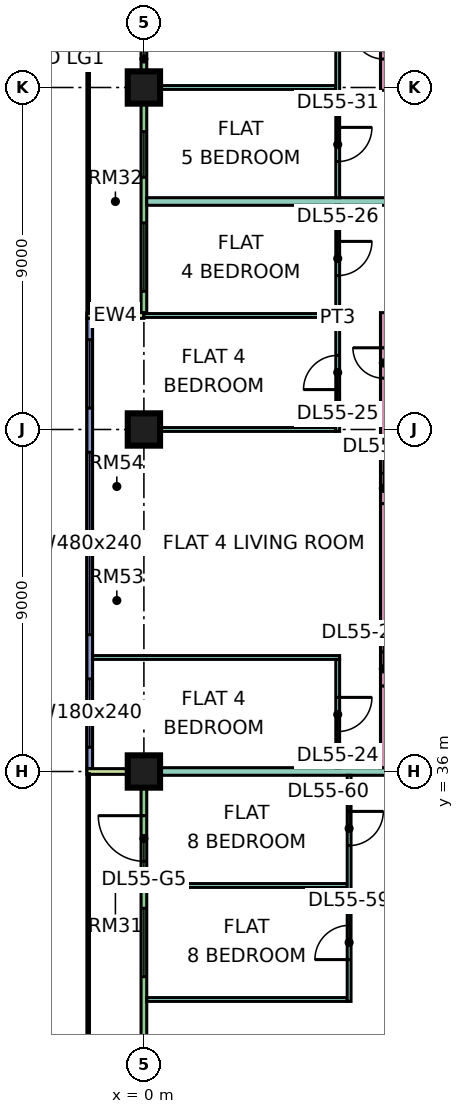
"""IFC4 building model, lengths in metres.
Left out: names, types, materials, properties, quantities, classifications, styles, units other than length and angle.
Written with IfcOpenShell. Run it as: python <this file> out.ifc"""

import sys

from ifc_helpers import new_model, si_unit, direction, frame, frame_2d, origin, origin_2d, place, context, subcontext, project, spatial, rectangle, extrude, element, fill, save


model = new_model("IFC4")
c1 = context("Model", 3, precision=1e-05, world=origin(), true_north=direction((0.0, 1.0)))
c2 = subcontext(c1, "Body", "Model", "MODEL_VIEW")
j1 = project(units=[si_unit("LENGTHUNIT", "METRE"), si_unit("PLANEANGLEUNIT", "RADIAN")], contexts=[c1])
p1 = place(None, origin())
s1 = spatial("IfcSite", under=j1, at=p1, CompositionType="ELEMENT")
p2 = place(p1, origin())
s2 = spatial("IfcBuilding", under=s1, at=p2, CompositionType="ELEMENT")
p3 = place(p2, frame((0.0, 0.0, 234.15)))
s3 = spatial("IfcBuildingStorey", under=s2, at=p3, CompositionType="ELEMENT", Elevation=234.15)
p4 = place(p3, frame((0.0, 36.0, 0.0), z_axis=(0.0, 0.0, 1.0), x_axis=(1.0, 0.0, 0.0)))
e1 = element("IfcColumn", 1, at=p4, inside=s3, PredefinedType="COLUMN", context=c2, shape_type="SweptSolid", body=[
    extrude(rectangle(XDim=0.85, YDim=0.85, at=origin_2d()), origin(), (0.0, 0.0, 1.0), 3.75),
])
p5 = place(p3, frame((0.0, 45.0, 0.0), z_axis=(0.0, 0.0, 1.0), x_axis=(1.0, 0.0, 0.0)))
e2 = element("IfcColumn", 2, at=p5, inside=s3, PredefinedType="COLUMN", context=c2, shape_type="SweptSolid", body=[
    extrude(rectangle(XDim=0.85, YDim=0.85, at=origin_2d()), origin(), (0.0, 0.0, 1.0), 3.75),
])
p6 = place(p3, frame((0.0, 54.0, 0.0), z_axis=(0.0, 0.0, 1.0), x_axis=(1.0, 0.0, 0.0)))
e3 = element("IfcColumn", 3, at=p6, inside=s3, PredefinedType="COLUMN", context=c2, shape_type="SweptSolid", body=[
    extrude(rectangle(XDim=0.85, YDim=0.85, at=origin_2d()), origin(), (0.0, 0.0, 1.0), 3.75),
])
p7 = place(p3, frame((0.0, 61.425, 0.0), z_axis=(0.0, 0.0, 1.0), x_axis=(0.0, -1.0, 0.0)))
e4 = element("IfcWall", 4, at=p7, inside=s3, PredefinedType="SOLIDWALL", context=c2, shape_type="SweptSolid", body=[
    extrude(rectangle(XDim=13.35, YDim=0.15, at=frame_2d((6.675, 0.0))), origin(), (0.0, 0.0, 1.0), 3.35),
])
p8 = place(p7, frame((1.312, 0.0, 0.0)))
e5 = element("IfcOpeningElement", 5, at=p8, cuts=e4, PredefinedType="OPENING", context=c2, shape_type="SweptSolid", body=[
    extrude(rectangle(XDim=1.8, YDim=2.4, at=frame_2d((0.9, 1.2))), frame((0.0, 0.085, 0.0), z_axis=(0.0, -1.0, 0.0), x_axis=(1.0, 0.0, 0.0)), (0.0, 0.0, 1.0), 0.17),
])
p9 = place(p7, frame((5.062, 0.0, 0.45)))
e6 = element("IfcOpeningElement", 6, at=p9, cuts=e4, PredefinedType="OPENING", context=c2, shape_type="SweptSolid", body=[
    extrude(rectangle(XDim=1.2, YDim=2.4, at=frame_2d((0.6, 1.2))), frame((0.0, 0.085, 0.0), z_axis=(0.0, -1.0, 0.0), x_axis=(1.0, 0.0, 0.0)), (0.0, 0.0, 1.0), 0.17),
])
p10 = place(p7, frame((8.587, 0.0, 0.45)))
e7 = element("IfcOpeningElement", 7, at=p10, cuts=e4, PredefinedType="OPENING", context=c2, shape_type="SweptSolid", body=[
    extrude(rectangle(XDim=1.2, YDim=2.4, at=frame_2d((0.6, 1.2))), frame((0.0, 0.085, 0.0), z_axis=(0.0, -1.0, 0.0), x_axis=(1.0, 0.0, 0.0)), (0.0, 0.0, 1.0), 0.17),
])
p11 = place(p7, frame((10.988, 0.0, 0.45)))
e8 = element("IfcOpeningElement", 8, at=p11, cuts=e4, PredefinedType="OPENING", context=c2, shape_type="SweptSolid", body=[
    extrude(rectangle(XDim=1.8, YDim=2.4, at=frame_2d((0.9, 1.2))), frame((0.0, 0.085, 0.0), z_axis=(0.0, -1.0, 0.0), x_axis=(1.0, 0.0, 0.0)), (0.0, 0.0, 1.0), 0.17),
])
p12 = place(p3, frame((-1.5, 48.0, 0.0), z_axis=(0.0, 0.0, 1.0), x_axis=(1.0, 0.0, 0.0)))
e9 = element("IfcWall", 9, at=p12, inside=s3, PredefinedType="SOLIDWALL", context=c2, shape_type="SweptSolid", body=[
    extrude(rectangle(XDim=1.5, YDim=0.15, at=frame_2d((0.75, 0.0))), origin(), (0.0, 0.0, 1.0), 3.35),
])
p13 = place(p3, frame((-1.425, 47.925, 0.0), z_axis=(0.0, 0.0, 1.0), x_axis=(0.0, -1.0, 0.0)))
e10 = element("IfcWall", 10, at=p13, inside=s3, PredefinedType="SOLIDWALL", context=c2, shape_type="SweptSolid", body=[
    extrude(rectangle(XDim=11.85, YDim=0.15, at=frame_2d((5.925, 0.0))), origin(), (0.0, 0.0, 1.0), 3.35),
])
p14 = place(p13, frame((0.562, 0.0, 0.45)))
e11 = element("IfcOpeningElement", 11, at=p14, cuts=e10, PredefinedType="OPENING", context=c2, shape_type="SweptSolid", body=[
    extrude(rectangle(XDim=1.8, YDim=2.4, at=frame_2d((0.9, 1.2))), frame((0.0, 0.085, 0.0), z_axis=(0.0, -1.0, 0.0), x_axis=(1.0, 0.0, 0.0)), (0.0, 0.0, 1.0), 0.17),
])
p15 = place(p13, frame((3.525, 0.0, 0.45)))
e12 = element("IfcOpeningElement", 12, at=p15, cuts=e10, PredefinedType="OPENING", context=c2, shape_type="SweptSolid", body=[
    extrude(rectangle(XDim=4.8, YDim=2.4, at=frame_2d((2.4, 1.2))), frame((0.0, 0.085, 0.0), z_axis=(0.0, -1.0, 0.0), x_axis=(1.0, 0.0, 0.0)), (0.0, 0.0, 1.0), 0.17),
])
p16 = place(p13, frame((9.488, 0.0, 0.45)))
e13 = element("IfcOpeningElement", 13, at=p16, cuts=e10, PredefinedType="OPENING", context=c2, shape_type="SweptSolid", body=[
    extrude(rectangle(XDim=1.8, YDim=2.4, at=frame_2d((0.9, 1.2))), frame((0.0, 0.085, 0.0), z_axis=(0.0, -1.0, 0.0), x_axis=(1.0, 0.0, 0.0)), (0.0, 0.0, 1.0), 0.17),
])
p17 = place(p3, frame((0.0, 35.925, 0.0), z_axis=(0.0, 0.0, 1.0), x_axis=(0.0, -1.0, 0.0)))
e14 = element("IfcWall", 14, at=p17, inside=s3, PredefinedType="SOLIDWALL", context=c2, shape_type="SweptSolid", body=[
    extrude(rectangle(XDim=11.85, YDim=0.15, at=frame_2d((5.925, 0.0))), origin(), (0.0, 0.0, 1.0), 3.35),
])
p18 = place(p17, frame((1.087, 0.0, 0.0)))
e15 = element("IfcOpeningElement", 15, at=p18, cuts=e14, PredefinedType="OPENING", context=c2, shape_type="SweptSolid", body=[
    extrude(rectangle(XDim=1.2, YDim=2.4, at=frame_2d((0.6, 1.2))), frame((0.0, 0.085, 0.0), z_axis=(0.0, -1.0, 0.0), x_axis=(1.0, 0.0, 0.0)), (0.0, 0.0, 1.0), 0.17),
])
p19 = place(p17, frame((3.525, 0.0, 0.45)))
e16 = element("IfcOpeningElement", 16, at=p19, cuts=e14, PredefinedType="OPENING", context=c2, shape_type="SweptSolid", body=[
    extrude(rectangle(XDim=1.8, YDim=2.4, at=frame_2d((0.9, 1.2))), frame((0.0, 0.085, 0.0), z_axis=(0.0, -1.0, 0.0), x_axis=(1.0, 0.0, 0.0)), (0.0, 0.0, 1.0), 0.17),
])
p20 = place(p17, frame((7.163, 0.0, 0.45)))
e17 = element("IfcOpeningElement", 17, at=p20, cuts=e14, PredefinedType="OPENING", context=c2, shape_type="SweptSolid", body=[
    extrude(rectangle(XDim=3.0, YDim=2.4, at=frame_2d((1.5, 1.2))), frame((0.0, 0.085, 0.0), z_axis=(0.0, -1.0, 0.0), x_axis=(1.0, 0.0, 0.0)), (0.0, 0.0, 1.0), 0.17),
])
p21 = place(p3, frame((-1.5, 36.0, 0.0), z_axis=(0.0, 0.0, 1.0), x_axis=(1.0, 0.0, 0.0)))
e18 = element("IfcWall", 18, at=p21, inside=s3, PredefinedType="SOLIDWALL", context=c2, shape_type="SweptSolid", body=[
    extrude(rectangle(XDim=1.5, YDim=0.15, at=frame_2d((0.75, 0.0))), origin(), (0.0, 0.0, 1.0), 3.35),
])
e19 = element("IfcWall", 19, at=p4, inside=s3, PredefinedType="PARTITIONING", context=c2, shape_type="SweptSolid", body=[
    extrude(rectangle(XDim=6.375, YDim=0.2, at=frame_2d((3.188, 0.0))), origin(), (0.0, 0.0, 1.0), 3.35),
])
p22 = place(p3, frame((-1.35, 39.0, 0.0), z_axis=(0.0, 0.0, 1.0), x_axis=(1.0, 0.0, 0.0)))
e20 = element("IfcWall", 20, at=p22, inside=s3, PredefinedType="PARTITIONING", context=c2, shape_type="SweptSolid", body=[
    extrude(rectangle(XDim=6.5, YDim=0.1, at=frame_2d((3.25, 0.0))), origin(), (0.0, 0.0, 1.0), 3.35),
])
e21 = element("IfcWall", 21, at=p5, inside=s3, PredefinedType="PARTITIONING", context=c2, shape_type="SweptSolid", body=[
    extrude(rectangle(XDim=5.05, YDim=0.1, at=frame_2d((2.525, 0.0))), origin(), (0.0, 0.0, 1.0), 3.35),
])
p23 = place(p3, frame((0.0, 48.0, 0.0), z_axis=(0.0, 0.0, 1.0), x_axis=(1.0, 0.0, 0.0)))
e22 = element("IfcWall", 22, at=p23, inside=s3, PredefinedType="PARTITIONING", context=c2, shape_type="SweptSolid", body=[
    extrude(rectangle(XDim=5.05, YDim=0.1, at=frame_2d((2.525, 0.0))), origin(), (0.0, 0.0, 1.0), 3.35),
])
for number, where, z_axis, x_axis in (
    (23, (0.074, 30.0, 0.0), (0.0, 0.0, 1.0), (1.0, 0.0, 0.0)),
    (24, (0.074, 33.0, 0.0), (0.0, 0.0, 1.0), (1.0, 0.0, 0.0)),
):
    element("IfcWall", number, at=place(p3, frame(where, z_axis=z_axis, x_axis=x_axis)), inside=s3, PredefinedType="PARTITIONING", context=c2, shape_type="SweptSolid", body=[
        extrude(rectangle(XDim=5.276, YDim=0.1, at=frame_2d((2.638, 0.0))), origin(), (0.0, 0.0, 1.0), 3.35),
    ])
p24 = place(p3, frame((0.074, 51.0, 0.0), z_axis=(0.0, 0.0, 1.0), x_axis=(1.0, 0.0, 0.0)))
e25 = element("IfcWall", 25, at=p24, inside=s3, PredefinedType="PARTITIONING", context=c2, shape_type="SweptSolid", body=[
    extrude(rectangle(XDim=9.426, YDim=0.2, at=frame_2d((4.713, 0.0))), origin(), (0.0, 0.0, 1.0), 3.35),
])
p25 = place(p3, frame((0.074, 54.0, 0.0), z_axis=(0.0, 0.0, 1.0), x_axis=(1.0, 0.0, 0.0)))
e26 = element("IfcWall", 26, at=p25, inside=s3, PredefinedType="PARTITIONING", context=c2, shape_type="SweptSolid", body=[
    extrude(rectangle(XDim=4.976, YDim=0.1, at=frame_2d((2.488, 0.0))), origin(), (0.0, 0.0, 1.0), 3.35),
])
p26 = place(p3, frame((5.1, 36.1, 0.0), z_axis=(0.0, 0.0, 1.0), x_axis=(0.0, 1.0, 0.0)))
e27 = element("IfcWall", 27, at=p26, inside=s3, PredefinedType="PARTITIONING", context=c2, shape_type="SweptSolid", body=[
    extrude(rectangle(XDim=2.85, YDim=0.1, at=frame_2d((1.425, 0.0))), origin(), (0.0, 0.0, 1.0), 3.35),
])
p27 = place(p26, frame((0.95, 0.0, 0.0)))
e28 = element("IfcOpeningElement", 28, at=p27, cuts=e27, PredefinedType="OPENING", context=c2, shape_type="SweptSolid", body=[
    extrude(rectangle(XDim=0.9, YDim=2.1, at=frame_2d((0.45, 1.05))), frame((0.0, 0.06, 0.0), z_axis=(0.0, -1.0, 0.0), x_axis=(1.0, 0.0, 0.0)), (0.0, 0.0, 1.0), 0.12),
])
p28 = place(p3, frame((5.1, 44.95, 0.0), z_axis=(0.0, 0.0, 1.0), x_axis=(0.0, 1.0, 0.0)))
e29 = element("IfcWall", 29, at=p28, inside=s3, PredefinedType="PARTITIONING", context=c2, shape_type="SweptSolid", body=[
    extrude(rectangle(XDim=5.95, YDim=0.1, at=frame_2d((2.975, 0.0))), origin(), (0.0, 0.0, 1.0), 3.35),
])
p29 = place(p28, frame((1.1, 0.0, 0.0)))
e30 = element("IfcOpeningElement", 30, at=p29, cuts=e29, PredefinedType="OPENING", context=c2, shape_type="SweptSolid", body=[
    extrude(rectangle(XDim=0.9, YDim=2.1, at=frame_2d((0.45, 1.05))), frame((0.0, 0.06, 0.0), z_axis=(0.0, -1.0, 0.0), x_axis=(1.0, 0.0, 0.0)), (0.0, 0.0, 1.0), 0.12),
])
p30 = place(p28, frame((4.1, 0.0, 0.0)))
e31 = element("IfcOpeningElement", 31, at=p30, cuts=e29, PredefinedType="OPENING", context=c2, shape_type="SweptSolid", body=[
    extrude(rectangle(XDim=0.9, YDim=2.1, at=frame_2d((0.45, 1.05))), frame((0.0, 0.06, 0.0), z_axis=(0.0, -1.0, 0.0), x_axis=(1.0, 0.0, 0.0)), (0.0, 0.0, 1.0), 0.12),
])
p31 = place(p3, frame((5.1, 51.1, 0.0), z_axis=(0.0, 0.0, 1.0), x_axis=(0.0, 1.0, 0.0)))
e32 = element("IfcWall", 32, at=p31, inside=s3, PredefinedType="PARTITIONING", context=c2, shape_type="SweptSolid", body=[
    extrude(rectangle(XDim=5.95, YDim=0.1, at=frame_2d((2.975, 0.0))), origin(), (0.0, 0.0, 1.0), 3.35),
])
p32 = place(p31, frame((0.95, 0.0, 0.0)))
e33 = element("IfcOpeningElement", 33, at=p32, cuts=e32, PredefinedType="OPENING", context=c2, shape_type="SweptSolid", body=[
    extrude(rectangle(XDim=0.9, YDim=2.1, at=frame_2d((0.45, 1.05))), frame((0.0, 0.06, 0.0), z_axis=(0.0, -1.0, 0.0), x_axis=(1.0, 0.0, 0.0)), (0.0, 0.0, 1.0), 0.12),
])
p33 = place(p31, frame((3.95, 0.0, 0.0)))
e34 = element("IfcOpeningElement", 34, at=p33, cuts=e32, PredefinedType="OPENING", context=c2, shape_type="SweptSolid", body=[
    extrude(rectangle(XDim=0.9, YDim=2.1, at=frame_2d((0.45, 1.05))), frame((0.0, 0.06, 0.0), z_axis=(0.0, -1.0, 0.0), x_axis=(1.0, 0.0, 0.0)), (0.0, 0.0, 1.0), 0.12),
])
p34 = place(p3, frame((5.4, 29.95, 0.0), z_axis=(0.0, 0.0, 1.0), x_axis=(0.0, 1.0, 0.0)))
e35 = element("IfcWall", 35, at=p34, inside=s3, PredefinedType="PARTITIONING", context=c2, shape_type="SweptSolid", body=[
    extrude(rectangle(XDim=5.95, YDim=0.1, at=frame_2d((2.975, 0.0))), origin(), (0.0, 0.0, 1.0), 3.35),
])
p35 = place(p34, frame((1.1, 0.0, 0.0)))
e36 = element("IfcOpeningElement", 36, at=p35, cuts=e35, PredefinedType="OPENING", context=c2, shape_type="SweptSolid", body=[
    extrude(rectangle(XDim=0.9, YDim=2.1, at=frame_2d((0.45, 1.05))), frame((0.0, 0.06, 0.0), z_axis=(0.0, -1.0, 0.0), x_axis=(1.0, 0.0, 0.0)), (0.0, 0.0, 1.0), 0.12),
])
p36 = place(p34, frame((4.1, 0.0, 0.0)))
e37 = element("IfcOpeningElement", 37, at=p36, cuts=e35, PredefinedType="OPENING", context=c2, shape_type="SweptSolid", body=[
    extrude(rectangle(XDim=0.9, YDim=2.1, at=frame_2d((0.45, 1.05))), frame((0.0, 0.06, 0.0), z_axis=(0.0, -1.0, 0.0), x_axis=(1.0, 0.0, 0.0)), (0.0, 0.0, 1.0), 0.12),
])
p37 = place(p3, frame((6.3, 36.1, 0.0), z_axis=(0.0, 0.0, 1.0), x_axis=(0.0, 1.0, 0.0)))
e38 = element("IfcWall", 38, at=p37, inside=s3, PredefinedType="PARTITIONING", context=c2, shape_type="SweptSolid", body=[
    extrude(rectangle(XDim=11.975, YDim=0.15, at=frame_2d((5.987, 0.0))), origin(), (0.0, 0.0, 1.0), 3.35),
])
p38 = place(p37, frame((6.95, 0.0, 0.0)))
e39 = element("IfcOpeningElement", 39, at=p38, cuts=e38, PredefinedType="OPENING", context=c2, shape_type="SweptSolid", body=[
    extrude(rectangle(XDim=0.8, YDim=2.1, at=frame_2d((0.4, 1.05))), frame((0.0, 0.085, 0.0), z_axis=(0.0, -1.0, 0.0), x_axis=(1.0, 0.0, 0.0)), (0.0, 0.0, 1.0), 0.17),
])
p39 = place(p37, frame((2.15, 0.0, 0.0)))
e40 = element("IfcOpeningElement", 40, at=p39, cuts=e38, PredefinedType="OPENING", context=c2, shape_type="SweptSolid", body=[
    extrude(rectangle(XDim=0.9, YDim=2.1, at=frame_2d((0.45, 1.05))), frame((0.0, 0.085, 0.0), z_axis=(0.0, -1.0, 0.0), x_axis=(1.0, 0.0, 0.0)), (0.0, 0.0, 1.0), 0.17),
])
p40 = place(p37, frame((10.25, 0.0, 0.0)))
e41 = element("IfcOpeningElement", 41, at=p40, cuts=e38, PredefinedType="OPENING", context=c2, shape_type="SweptSolid", body=[
    extrude(rectangle(XDim=0.8, YDim=2.1, at=frame_2d((0.4, 1.05))), frame((0.0, 0.085, 0.0), z_axis=(0.0, -1.0, 0.0), x_axis=(1.0, 0.0, 0.0)), (0.0, 0.0, 1.0), 0.17),
])
p41 = place(p3, frame((6.3, 53.925, 0.0), z_axis=(0.0, 0.0, 1.0), x_axis=(0.0, 1.0, 0.0)))
e42 = element("IfcWall", 42, at=p41, inside=s3, PredefinedType="PARTITIONING", context=c2, shape_type="SweptSolid", body=[
    extrude(rectangle(XDim=9.001, YDim=0.15, at=frame_2d((4.5, 0.0))), origin(), (0.0, 0.0, 1.0), 3.35),
])
p42 = place(p41, frame((3.525, 0.0, 0.0)))
e43 = element("IfcOpeningElement", 43, at=p42, cuts=e42, PredefinedType="OPENING", context=c2, shape_type="SweptSolid", body=[
    extrude(rectangle(XDim=0.8, YDim=2.1, at=frame_2d((0.4, 1.05))), frame((0.0, 0.085, 0.0), z_axis=(0.0, -1.0, 0.0), x_axis=(1.0, 0.0, 0.0)), (0.0, 0.0, 1.0), 0.17),
])
p43 = place(p41, frame((6.825, 0.0, 0.0)))
e44 = element("IfcOpeningElement", 44, at=p43, cuts=e42, PredefinedType="OPENING", context=c2, shape_type="SweptSolid", body=[
    extrude(rectangle(XDim=0.9, YDim=2.1, at=frame_2d((0.45, 1.05))), frame((0.0, 0.085, 0.0), z_axis=(0.0, -1.0, 0.0), x_axis=(1.0, 0.0, 0.0)), (0.0, 0.0, 1.0), 0.17),
])
p44 = place(p41, frame((0.825, 0.0, 0.0)))
e45 = element("IfcOpeningElement", 45, at=p44, cuts=e42, PredefinedType="OPENING", context=c2, shape_type="SweptSolid", body=[
    extrude(rectangle(XDim=0.8, YDim=2.1, at=frame_2d((0.4, 1.05))), frame((0.0, 0.085, 0.0), z_axis=(0.0, -1.0, 0.0), x_axis=(1.0, 0.0, 0.0)), (0.0, 0.0, 1.0), 0.17),
])
p45 = place(p10, origin())
e46 = element("IfcWindow", 46, at=p45, inside=s3, PartitioningType="SINGLE_PANEL", PredefinedType="WINDOW", context=c2, shape_type="SweptSolid", body=[
    extrude(rectangle(XDim=1.2, YDim=2.4, at=frame_2d((0.6, 1.2))), frame((0.0, 0.03, 0.0), z_axis=(0.0, -1.0, 0.0), x_axis=(1.0, 0.0, 0.0)), (0.0, 0.0, 1.0), 0.06),
])
fill(e7, e46)
p46 = place(p11, origin())
e47 = element("IfcWindow", 47, at=p46, inside=s3, PartitioningType="SINGLE_PANEL", PredefinedType="WINDOW", context=c2, shape_type="SweptSolid", body=[
    extrude(rectangle(XDim=1.8, YDim=2.4, at=frame_2d((0.9, 1.2))), frame((0.0, 0.03, 0.0), z_axis=(0.0, -1.0, 0.0), x_axis=(1.0, 0.0, 0.0)), (0.0, 0.0, 1.0), 0.06),
])
fill(e8, e47)
p47 = place(p14, origin())
e48 = element("IfcWindow", 48, at=p47, inside=s3, PartitioningType="SINGLE_PANEL", PredefinedType="WINDOW", context=c2, shape_type="SweptSolid", body=[
    extrude(rectangle(XDim=1.8, YDim=2.4, at=frame_2d((0.9, 1.2))), frame((0.0, 0.03, 0.0), z_axis=(0.0, -1.0, 0.0), x_axis=(1.0, 0.0, 0.0)), (0.0, 0.0, 1.0), 0.06),
])
fill(e11, e48)
p48 = place(p15, origin())
e49 = element("IfcWindow", 49, at=p48, inside=s3, PartitioningType="SINGLE_PANEL", PredefinedType="WINDOW", context=c2, shape_type="SweptSolid", body=[
    extrude(rectangle(XDim=4.8, YDim=2.4, at=frame_2d((2.4, 1.2))), frame((0.0, 0.03, 0.0), z_axis=(0.0, -1.0, 0.0), x_axis=(1.0, 0.0, 0.0)), (0.0, 0.0, 1.0), 0.06),
])
fill(e12, e49)
p49 = place(p16, origin())
e50 = element("IfcWindow", 50, at=p49, inside=s3, PartitioningType="SINGLE_PANEL", PredefinedType="WINDOW", context=c2, shape_type="SweptSolid", body=[
    extrude(rectangle(XDim=1.8, YDim=2.4, at=frame_2d((0.9, 1.2))), frame((0.0, 0.03, 0.0), z_axis=(0.0, -1.0, 0.0), x_axis=(1.0, 0.0, 0.0)), (0.0, 0.0, 1.0), 0.06),
])
fill(e13, e50)
p50 = place(p18, frame((1.2, 0.0, 0.0), z_axis=(0.0, 0.0, 1.0), x_axis=(-1.0, 0.0, 0.0)))
e51 = element("IfcDoor", 51, at=p50, inside=s3, OperationType="DOUBLE_DOOR_SINGLE_SWING", PredefinedType="DOOR", context=c2, shape_type="SweptSolid", body=[
    extrude(rectangle(XDim=1.2, YDim=2.4, at=frame_2d((0.6, 1.2))), frame((0.0, 0.025, 0.0), z_axis=(0.0, -1.0, 0.0), x_axis=(1.0, 0.0, 0.0)), (0.0, 0.0, 1.0), 0.05),
])
fill(e15, e51)
p51 = place(p19, origin())
e52 = element("IfcWindow", 52, at=p51, inside=s3, PartitioningType="SINGLE_PANEL", PredefinedType="WINDOW", context=c2, shape_type="SweptSolid", body=[
    extrude(rectangle(XDim=1.8, YDim=2.4, at=frame_2d((0.9, 1.2))), frame((0.0, 0.03, 0.0), z_axis=(0.0, -1.0, 0.0), x_axis=(1.0, 0.0, 0.0)), (0.0, 0.0, 1.0), 0.06),
])
fill(e16, e52)
p52 = place(p38, frame((0.8, 0.0, 0.0), z_axis=(0.0, 0.0, 1.0), x_axis=(-1.0, 0.0, 0.0)))
e53 = element("IfcDoor", 53, at=p52, inside=s3, OperationType="SINGLE_SWING_LEFT", PredefinedType="DOOR", context=c2, shape_type="SweptSolid", body=[
    extrude(rectangle(XDim=0.8, YDim=2.1, at=frame_2d((0.4, 1.05))), frame((0.0, 0.025, 0.0), z_axis=(0.0, -1.0, 0.0), x_axis=(1.0, 0.0, 0.0)), (0.0, 0.0, 1.0), 0.05),
])
fill(e39, e53)
p53 = place(p27, origin())
e54 = element("IfcDoor", 54, at=p53, inside=s3, OperationType="SINGLE_SWING_RIGHT", PredefinedType="DOOR", context=c2, shape_type="SweptSolid", body=[
    extrude(rectangle(XDim=0.9, YDim=2.1, at=frame_2d((0.45, 1.05))), frame((0.0, 0.025, 0.0), z_axis=(0.0, -1.0, 0.0), x_axis=(1.0, 0.0, 0.0)), (0.0, 0.0, 1.0), 0.05),
])
fill(e28, e54)
p54 = place(p29, origin())
e55 = element("IfcDoor", 55, at=p54, inside=s3, OperationType="SINGLE_SWING_LEFT", PredefinedType="DOOR", context=c2, shape_type="SweptSolid", body=[
    extrude(rectangle(XDim=0.9, YDim=2.1, at=frame_2d((0.45, 1.05))), frame((0.0, 0.025, 0.0), z_axis=(0.0, -1.0, 0.0), x_axis=(1.0, 0.0, 0.0)), (0.0, 0.0, 1.0), 0.05),
])
fill(e30, e55)
p55 = place(p30, origin())
e56 = element("IfcDoor", 56, at=p55, inside=s3, OperationType="SINGLE_SWING_RIGHT", PredefinedType="DOOR", context=c2, shape_type="SweptSolid", body=[
    extrude(rectangle(XDim=0.9, YDim=2.1, at=frame_2d((0.45, 1.05))), frame((0.0, 0.025, 0.0), z_axis=(0.0, -1.0, 0.0), x_axis=(1.0, 0.0, 0.0)), (0.0, 0.0, 1.0), 0.05),
])
fill(e31, e56)
p56 = place(p39, frame((0.9, 0.0, 0.0), z_axis=(0.0, 0.0, 1.0), x_axis=(-1.0, 0.0, 0.0)))
e57 = element("IfcDoor", 57, at=p56, inside=s3, OperationType="SINGLE_SWING_LEFT", PredefinedType="DOOR", context=c2, shape_type="SweptSolid", body=[
    extrude(rectangle(XDim=0.9, YDim=2.1, at=frame_2d((0.45, 1.05))), frame((0.0, 0.025, 0.0), z_axis=(0.0, -1.0, 0.0), x_axis=(1.0, 0.0, 0.0)), (0.0, 0.0, 1.0), 0.05),
])
fill(e40, e57)
p57 = place(p40, frame((0.8, 0.0, 0.0), z_axis=(0.0, 0.0, 1.0), x_axis=(-1.0, 0.0, 0.0)))
e58 = element("IfcDoor", 58, at=p57, inside=s3, OperationType="SINGLE_SWING_RIGHT", PredefinedType="DOOR", context=c2, shape_type="SweptSolid", body=[
    extrude(rectangle(XDim=0.8, YDim=2.1, at=frame_2d((0.4, 1.05))), frame((0.0, 0.025, 0.0), z_axis=(0.0, -1.0, 0.0), x_axis=(1.0, 0.0, 0.0)), (0.0, 0.0, 1.0), 0.05),
])
fill(e41, e58)
p58 = place(p32, origin())
e59 = element("IfcDoor", 59, at=p58, inside=s3, OperationType="SINGLE_SWING_RIGHT", PredefinedType="DOOR", context=c2, shape_type="SweptSolid", body=[
    extrude(rectangle(XDim=0.9, YDim=2.1, at=frame_2d((0.45, 1.05))), frame((0.0, 0.025, 0.0), z_axis=(0.0, -1.0, 0.0), x_axis=(1.0, 0.0, 0.0)), (0.0, 0.0, 1.0), 0.05),
])
fill(e33, e59)
p59 = place(p44, frame((0.8, 0.0, 0.0), z_axis=(0.0, 0.0, 1.0), x_axis=(-1.0, 0.0, 0.0)))
e60 = element("IfcDoor", 60, at=p59, inside=s3, OperationType="SINGLE_SWING_RIGHT", PredefinedType="DOOR", context=c2, shape_type="SweptSolid", body=[
    extrude(rectangle(XDim=0.8, YDim=2.1, at=frame_2d((0.4, 1.05))), frame((0.0, 0.025, 0.0), z_axis=(0.0, -1.0, 0.0), x_axis=(1.0, 0.0, 0.0)), (0.0, 0.0, 1.0), 0.05),
])
fill(e45, e60)
p60 = place(p35, origin())
e61 = element("IfcDoor", 61, at=p60, inside=s3, OperationType="SINGLE_SWING_LEFT", PredefinedType="DOOR", context=c2, shape_type="SweptSolid", body=[
    extrude(rectangle(XDim=0.9, YDim=2.1, at=frame_2d((0.45, 1.05))), frame((0.0, 0.025, 0.0), z_axis=(0.0, -1.0, 0.0), x_axis=(1.0, 0.0, 0.0)), (0.0, 0.0, 1.0), 0.05),
])
fill(e36, e61)
p61 = place(p36, origin())
e62 = element("IfcDoor", 62, at=p61, inside=s3, OperationType="SINGLE_SWING_RIGHT", PredefinedType="DOOR", context=c2, shape_type="SweptSolid", body=[
    extrude(rectangle(XDim=0.9, YDim=2.1, at=frame_2d((0.45, 1.05))), frame((0.0, 0.025, 0.0), z_axis=(0.0, -1.0, 0.0), x_axis=(1.0, 0.0, 0.0)), (0.0, 0.0, 1.0), 0.05),
])
fill(e37, e62)
save(model, sys.argv[1])
